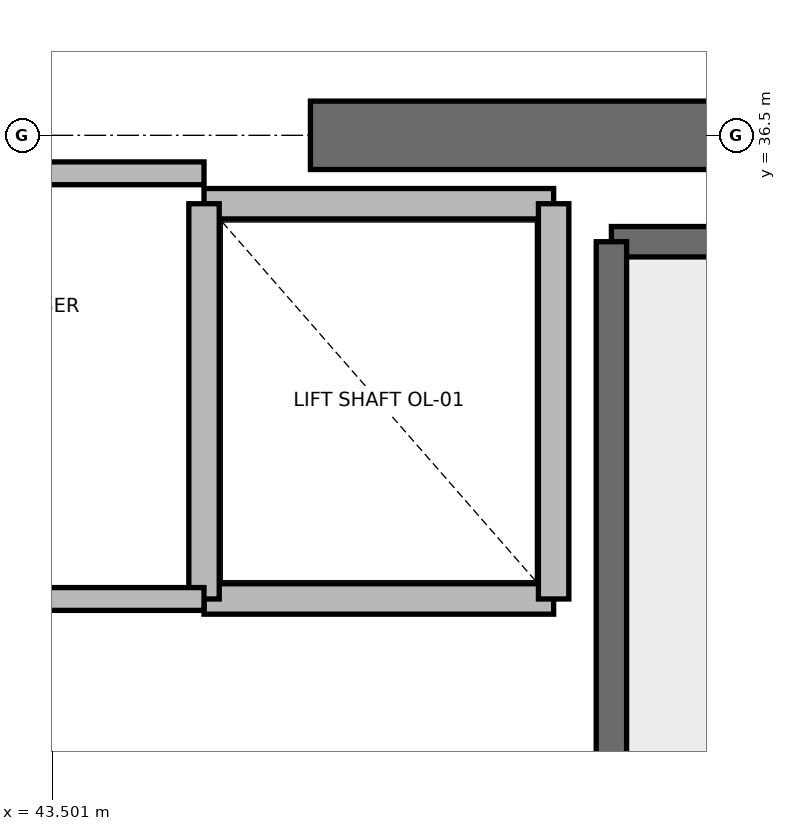
"""IFC4 building model, lengths in metres.
Left out: names, types, materials, properties, quantities, classifications, styles, units other than length and angle.
Written with IfcOpenShell. Run it as: python <this file> out.ifc"""

import sys

from ifc_helpers import new_model, si_unit, direction, frame, frame_2d, origin, place, context, subcontext, project, spatial, rectangle, extrude, element, save


model = new_model("IFC4")
c1 = context("Model", 3, precision=1e-05, world=origin(), true_north=direction((0.0, 1.0)))
c2 = subcontext(c1, "Body", "Model", "MODEL_VIEW")
j1 = project(units=[si_unit("LENGTHUNIT", "METRE"), si_unit("PLANEANGLEUNIT", "RADIAN")], contexts=[c1])
p1 = place(None, origin())
s1 = spatial("IfcSite", under=j1, at=p1, CompositionType="ELEMENT")
p2 = place(p1, origin())
s2 = spatial("IfcBuilding", under=s1, at=p2, CompositionType="ELEMENT")
p3 = place(p2, frame((0.0, 0.0, 287.2)))
s3 = spatial("IfcBuildingStorey", under=s2, at=p3, CompositionType="ELEMENT", Elevation=287.2)
p4 = place(p3, frame((45.2, 36.5, 0.0), z_axis=(0.0, 0.0, 1.0), x_axis=(1.0, 0.0, 0.0)))
e1 = element("IfcWall", 1, at=p4, inside=s3, PredefinedType="SHEAR", context=c2, shape_type="SweptSolid", body=[
    extrude(rectangle(XDim=5.8, YDim=0.45, at=frame_2d((2.9, 0.0))), origin(), (0.0, 0.0, 1.0), 3.785),
])
p5 = place(p3, frame((47.18, 35.8, 0.0), z_axis=(0.0, 0.0, 1.0), x_axis=(1.0, 0.0, 0.0)))
e2 = element("IfcWall", 2, at=p5, inside=s3, PredefinedType="SOLIDWALL", context=c2, shape_type="SweptSolid", body=[
    extrude(rectangle(XDim=3.12, YDim=0.2, at=frame_2d((1.56, 0.0))), origin(), (0.0, 0.0, 1.0), 3.785),
])
p6 = place(p3, frame((47.18, 27.62, 0.0), z_axis=(0.0, 0.0, 1.0), x_axis=(0.0, 1.0, 0.0)))
e3 = element("IfcWall", 3, at=p6, inside=s3, PredefinedType="SOLIDWALL", context=c2, shape_type="SweptSolid", body=[
    extrude(rectangle(XDim=8.18, YDim=0.2, at=frame_2d((4.09, 0.0))), origin(), (0.0, 0.0, 1.0), 3.785),
])
p7 = place(p3, frame((44.5, 33.45, 0.0), z_axis=(0.0, 0.0, 1.0), x_axis=(1.0, 0.0, 0.0)))
e4 = element("IfcWall", 4, at=p7, inside=s3, PredefinedType="SOLIDWALL", context=c2, shape_type="SweptSolid", body=[
    extrude(rectangle(XDim=2.3, YDim=0.2, at=frame_2d((1.15, 0.0))), origin(), (0.0, 0.0, 1.0), 3.785),
])
p8 = place(p3, frame((46.8, 36.05, 0.0), z_axis=(0.0, 0.0, 1.0), x_axis=(-1.0, 0.0, 0.0)))
e5 = element("IfcWall", 5, at=p8, inside=s3, PredefinedType="SOLIDWALL", context=c2, shape_type="SweptSolid", body=[
    extrude(rectangle(XDim=2.3, YDim=0.2, at=frame_2d((1.15, 0.0))), origin(), (0.0, 0.0, 1.0), 2.865),
])
p9 = place(p3, frame((44.5, 36.05, 0.0), z_axis=(0.0, 0.0, 1.0), x_axis=(0.0, -1.0, 0.0)))
e6 = element("IfcWall", 6, at=p9, inside=s3, PredefinedType="SOLIDWALL", context=c2, shape_type="SweptSolid", body=[
    extrude(rectangle(XDim=2.6, YDim=0.2, at=frame_2d((1.3, 0.0))), origin(), (0.0, 0.0, 1.0), 2.865),
])
p10 = place(p3, frame((46.8, 33.45, 0.0), z_axis=(0.0, 0.0, 1.0), x_axis=(0.0, 1.0, 0.0)))
e7 = element("IfcWall", 7, at=p10, inside=s3, PredefinedType="SOLIDWALL", context=c2, shape_type="SweptSolid", body=[
    extrude(rectangle(XDim=2.6, YDim=0.2, at=frame_2d((1.3, 0.0))), origin(), (0.0, 0.0, 1.0), 3.785),
])
p11 = place(p3, frame((41.56, 36.25, 0.0), z_axis=(0.0, 0.0, 1.0), x_axis=(1.0, 0.0, 0.0)))
e8 = element("IfcWall", 8, at=p11, inside=s3, PredefinedType="PARTITIONING", context=c2, shape_type="SweptSolid", body=[
    extrude(rectangle(XDim=2.94, YDim=0.15, at=frame_2d((1.47, 0.0))), origin(), (0.0, 0.0, 1.0), 2.85),
])
p12 = place(p3, frame((41.56, 33.45, 0.0), z_axis=(0.0, 0.0, 1.0), x_axis=(1.0, 0.0, 0.0)))
e9 = element("IfcWall", 9, at=p12, inside=s3, PredefinedType="PARTITIONING", context=c2, shape_type="SweptSolid", body=[
    extrude(rectangle(XDim=2.94, YDim=0.15, at=frame_2d((1.47, 0.0))), origin(), (0.0, 0.0, 1.0), 2.85),
])
p13 = place(p12, frame((1.03, 0.0, 0.0)))
e10 = element("IfcOpeningElement", 10, at=p13, cuts=e9, PredefinedType="OPENING", context=c2, shape_type="SweptSolid", body=[
    extrude(rectangle(XDim=0.88, YDim=2.1, at=frame_2d((0.44, 1.05))), frame((0.0, 0.075, 0.0), z_axis=(0.0, -1.0, 0.0), x_axis=(1.0, 0.0, 0.0)), (0.0, 0.0, 1.0), 0.15),
])
save(model, sys.argv[1])
